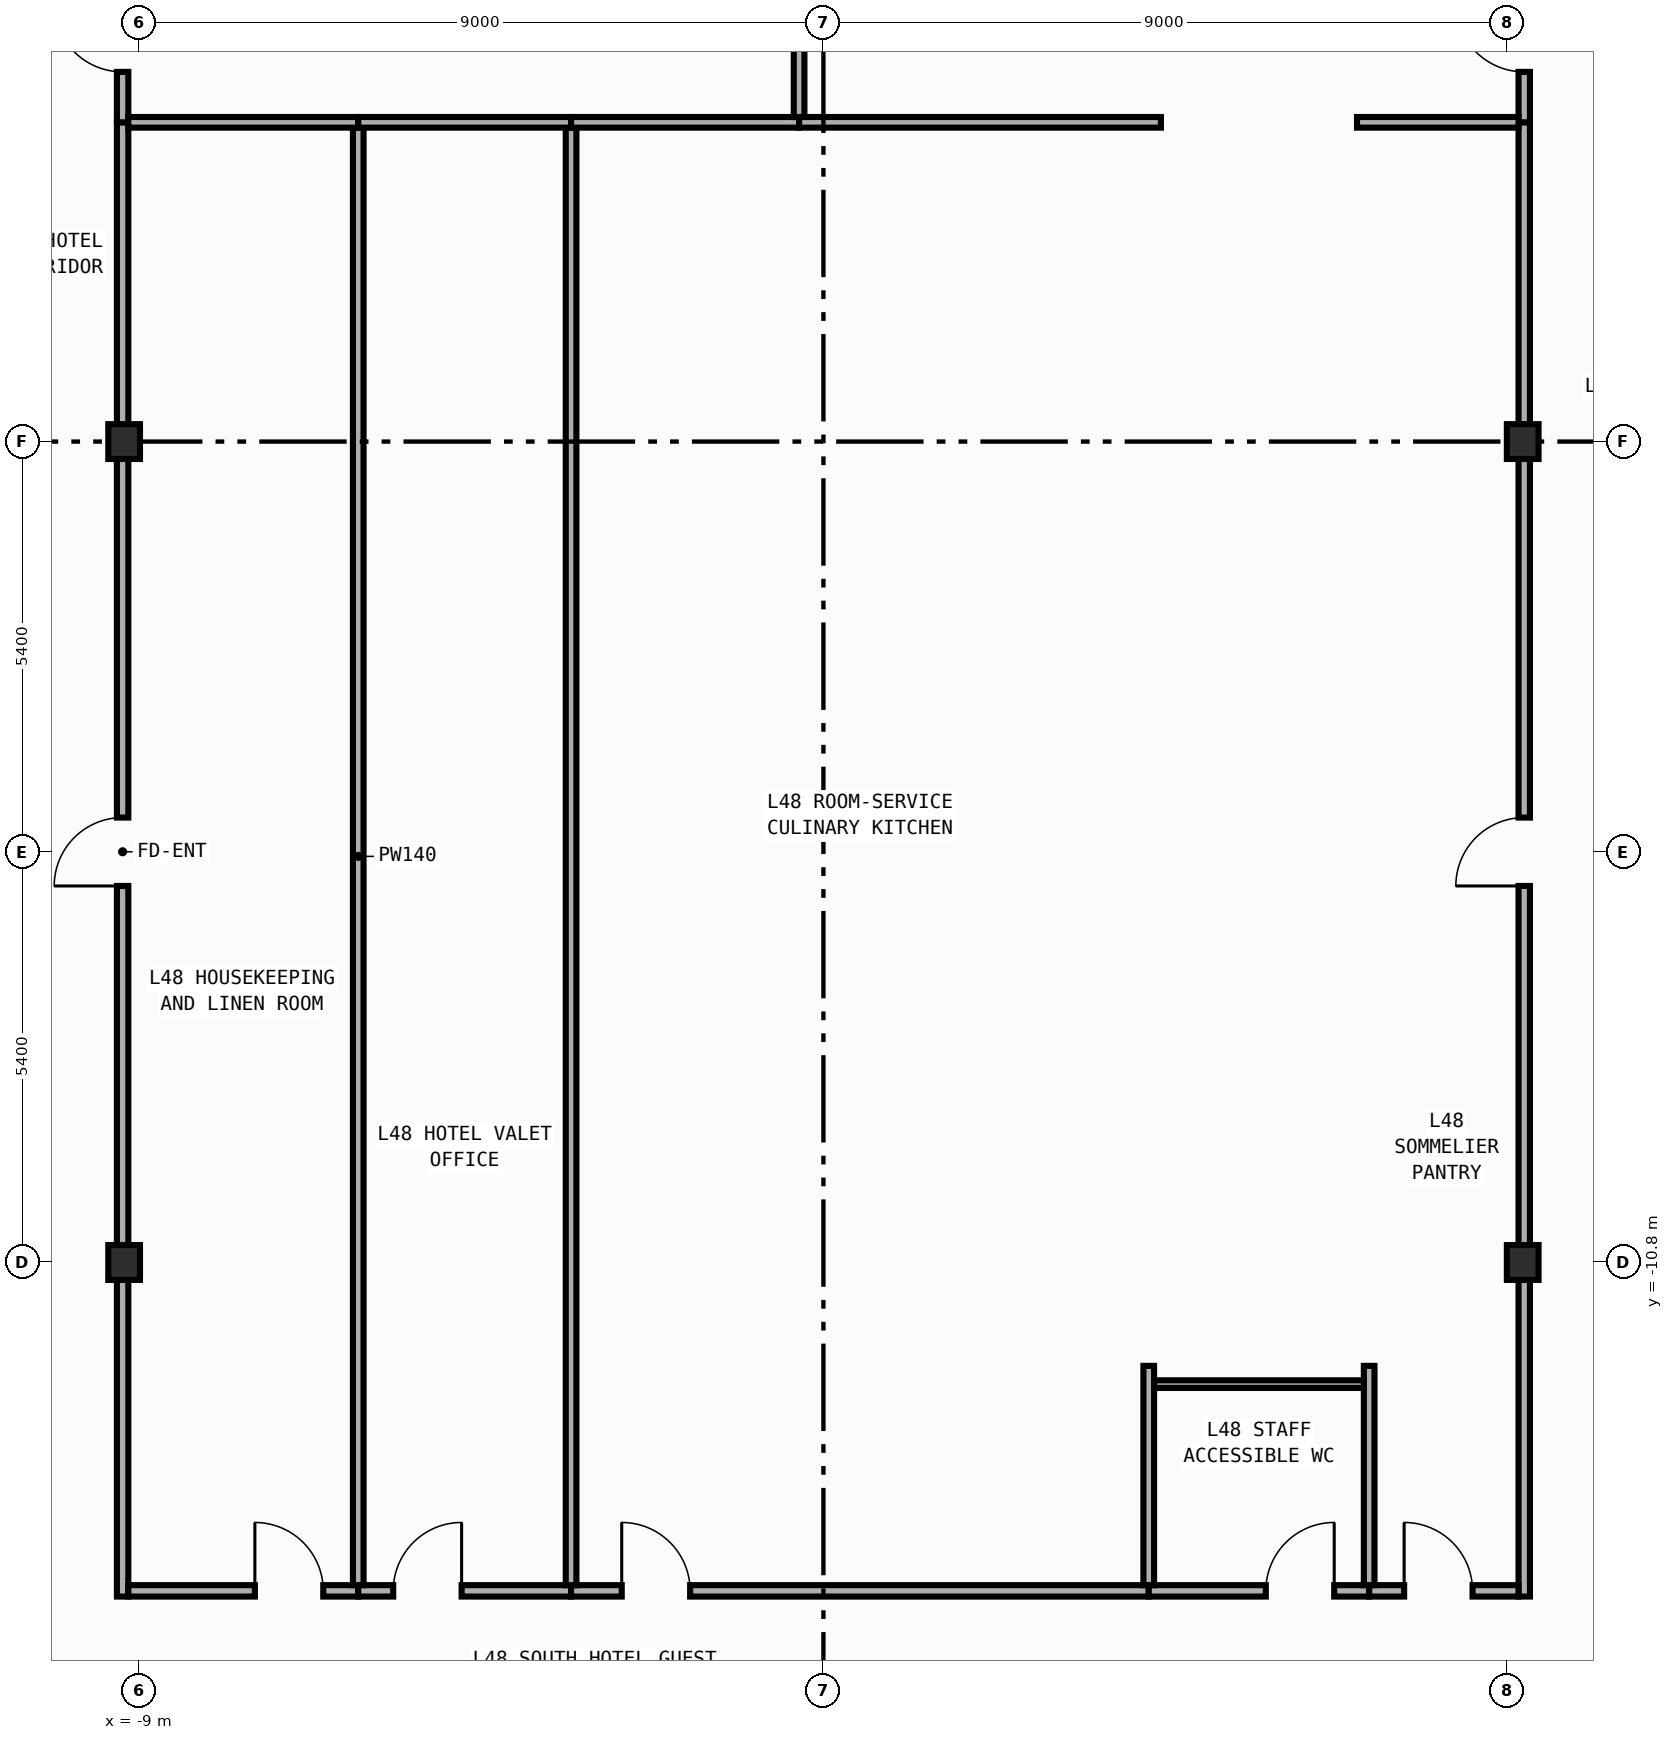
"""IFC4 building model, lengths in metres.
Left out: names, types, materials, properties, quantities, classifications, styles, units other than length and angle.
Written with IfcOpenShell. Run it as: python <this file> out.ifc"""

import sys

from ifc_helpers import new_model, si_unit, direction, frame, frame_2d, origin, origin_2d, place, context, subcontext, project, spatial, rectangle, i_section, extrude, element, fill, save


model = new_model("IFC4")
c1 = context("Model", 3, precision=1e-05, world=origin(), true_north=direction((0.0, 1.0)))
c2 = subcontext(c1, "Body", "Model", "MODEL_VIEW")
j1 = project(units=[si_unit("LENGTHUNIT", "METRE"), si_unit("PLANEANGLEUNIT", "RADIAN")], contexts=[c1])
p1 = place(None, origin())
s1 = spatial("IfcSite", under=j1, at=p1, CompositionType="ELEMENT")
p2 = place(p1, origin())
s2 = spatial("IfcBuilding", under=s1, at=p2, CompositionType="ELEMENT")
p3 = place(p2, frame((0.0, 0.0, 206.8)))
s3 = spatial("IfcBuildingStorey", under=s2, at=p3, CompositionType="ELEMENT", Elevation=206.8)
for number, where, z_axis, x_axis in (
    (1, (-9.2, -10.8, 0.0), (0.0, 0.0, 1.0), (1.0, 0.0, 0.0)),
    (2, (-9.2, 0.0, 0.0), (0.0, 0.0, 1.0), (1.0, 0.0, 0.0)),
    (3, (9.2, -10.8, 0.0), (0.0, 0.0, 1.0), (1.0, 0.0, 0.0)),
    (4, (9.2, 0.0, 0.0), (0.0, 0.0, 1.0), (1.0, 0.0, 0.0)),
):
    element("IfcColumn", number, at=place(p3, frame(where, z_axis=z_axis, x_axis=x_axis)), inside=s3, PredefinedType="COLUMN", context=c2, shape_type="SweptSolid", body=[
        extrude(i_section(OverallWidth=0.417, OverallDepth=0.458, WebThickness=0.03, FlangeThickness=0.05, FilletRadius=0.022, at=origin_2d()), origin(), (0.0, 0.0, 1.0), 3.8),
    ])
p4 = place(p3, frame((-9.22, -15.195, 0.0), z_axis=(0.0, 0.0, 1.0), x_axis=(0.0, 1.0, 0.0)))
e5 = element("IfcWall", 5, at=p4, inside=s3, PredefinedType="PARTITIONING", context=c2, shape_type="SweptSolid", body=[
    extrude(rectangle(XDim=19.395, YDim=0.15, at=frame_2d((9.698, 0.0))), origin(), (0.0, 0.0, 1.0), 2.952),
])
p5 = place(p4, frame((9.348, 0.0, 0.0)))
e6 = element("IfcOpeningElement", 6, at=p5, cuts=e5, PredefinedType="OPENING", context=c2, shape_type="SweptSolid", body=[
    extrude(rectangle(XDim=0.9, YDim=2.15, at=frame_2d((0.45, 1.075))), frame((0.0, 0.085, 0.0), z_axis=(0.0, -1.0, 0.0), x_axis=(1.0, 0.0, 0.0)), (0.0, 0.0, 1.0), 0.17),
])
p6 = place(p3, frame((-9.22, 4.2, 0.0), z_axis=(0.0, 0.0, 1.0), x_axis=(0.0, 1.0, 0.0)))
e7 = element("IfcWall", 7, at=p6, inside=s3, PredefinedType="PARTITIONING", context=c2, shape_type="SweptSolid", body=[
    extrude(rectangle(XDim=12.195, YDim=0.15, at=frame_2d((6.098, 0.0))), origin(), (0.0, 0.0, 1.0), 2.952),
])
p7 = place(p6, frame((0.663, 0.0, 0.0)))
e8 = element("IfcOpeningElement", 8, at=p7, cuts=e7, PredefinedType="OPENING", context=c2, shape_type="SweptSolid", body=[
    extrude(rectangle(XDim=0.9, YDim=2.15, at=frame_2d((0.45, 1.075))), frame((0.0, 0.085, 0.0), z_axis=(0.0, -1.0, 0.0), x_axis=(1.0, 0.0, 0.0)), (0.0, 0.0, 1.0), 0.17),
])
p8 = place(p3, frame((9.22, -15.195, 0.0), z_axis=(0.0, 0.0, 1.0), x_axis=(0.0, 1.0, 0.0)))
e9 = element("IfcWall", 9, at=p8, inside=s3, PredefinedType="PARTITIONING", context=c2, shape_type="SweptSolid", body=[
    extrude(rectangle(XDim=19.395, YDim=0.15, at=frame_2d((9.698, 0.0))), origin(), (0.0, 0.0, 1.0), 2.952),
])
p9 = place(p8, frame((9.348, 0.0, 0.0)))
e10 = element("IfcOpeningElement", 10, at=p9, cuts=e9, PredefinedType="OPENING", context=c2, shape_type="SweptSolid", body=[
    extrude(rectangle(XDim=0.9, YDim=2.15, at=frame_2d((0.45, 1.075))), frame((0.0, 0.085, 0.0), z_axis=(0.0, -1.0, 0.0), x_axis=(1.0, 0.0, 0.0)), (0.0, 0.0, 1.0), 0.17),
])
p10 = place(p3, frame((9.22, 4.2, 0.0), z_axis=(0.0, 0.0, 1.0), x_axis=(0.0, 1.0, 0.0)))
e11 = element("IfcWall", 11, at=p10, inside=s3, PredefinedType="PARTITIONING", context=c2, shape_type="SweptSolid", body=[
    extrude(rectangle(XDim=12.195, YDim=0.15, at=frame_2d((6.098, 0.0))), origin(), (0.0, 0.0, 1.0), 2.952),
])
p11 = place(p10, frame((0.663, 0.0, 0.0)))
e12 = element("IfcOpeningElement", 12, at=p11, cuts=e11, PredefinedType="OPENING", context=c2, shape_type="SweptSolid", body=[
    extrude(rectangle(XDim=0.9, YDim=2.15, at=frame_2d((0.45, 1.075))), frame((0.0, 0.085, 0.0), z_axis=(0.0, -1.0, 0.0), x_axis=(1.0, 0.0, 0.0)), (0.0, 0.0, 1.0), 0.17),
])
p12 = place(p3, frame((-9.145, -15.12, 0.0), z_axis=(0.0, 0.0, 1.0), x_axis=(1.0, 0.0, 0.0)))
e13 = element("IfcWall", 13, at=p12, inside=s3, PredefinedType="PARTITIONING", context=c2, shape_type="SweptSolid", body=[
    extrude(rectangle(XDim=3.025, YDim=0.15, at=frame_2d((1.512, 0.0))), origin(), (0.0, 0.0, 1.0), 3.54),
])
p13 = place(p12, frame((1.665, 0.0, 0.0)))
e14 = element("IfcOpeningElement", 14, at=p13, cuts=e13, PredefinedType="OPENING", context=c2, shape_type="SweptSolid", body=[
    extrude(rectangle(XDim=0.9, YDim=2.15, at=frame_2d((0.45, 1.075))), frame((0.0, 0.085, 0.0), z_axis=(0.0, -1.0, 0.0), x_axis=(1.0, 0.0, 0.0)), (0.0, 0.0, 1.0), 0.17),
])
p14 = place(p3, frame((-6.12, -15.12, 0.0), z_axis=(0.0, 0.0, 1.0), x_axis=(1.0, 0.0, 0.0)))
e15 = element("IfcWall", 15, at=p14, inside=s3, PredefinedType="PARTITIONING", context=c2, shape_type="SweptSolid", body=[
    extrude(rectangle(XDim=2.8, YDim=0.15, at=frame_2d((1.4, 0.0))), origin(), (0.0, 0.0, 1.0), 3.54),
])
p15 = place(p14, frame((0.46, 0.0, 0.0)))
e16 = element("IfcOpeningElement", 16, at=p15, cuts=e15, PredefinedType="OPENING", context=c2, shape_type="SweptSolid", body=[
    extrude(rectangle(XDim=0.9, YDim=2.15, at=frame_2d((0.45, 1.075))), frame((0.0, 0.085, 0.0), z_axis=(0.0, -1.0, 0.0), x_axis=(1.0, 0.0, 0.0)), (0.0, 0.0, 1.0), 0.17),
])
p16 = place(p3, frame((-3.32, -15.12, 0.0), z_axis=(0.0, 0.0, 1.0), x_axis=(1.0, 0.0, 0.0)))
e17 = element("IfcWall", 17, at=p16, inside=s3, PredefinedType="PARTITIONING", context=c2, shape_type="SweptSolid", body=[
    extrude(rectangle(XDim=7.6, YDim=0.15, at=frame_2d((3.8, 0.0))), origin(), (0.0, 0.0, 1.0), 3.54),
])
p17 = place(p16, frame((0.667, 0.0, 0.0)))
e18 = element("IfcOpeningElement", 18, at=p17, cuts=e17, PredefinedType="OPENING", context=c2, shape_type="SweptSolid", body=[
    extrude(rectangle(XDim=0.9, YDim=2.15, at=frame_2d((0.45, 1.075))), frame((0.0, 0.085, 0.0), z_axis=(0.0, -1.0, 0.0), x_axis=(1.0, 0.0, 0.0)), (0.0, 0.0, 1.0), 0.17),
])
p18 = place(p3, frame((4.28, -15.12, 0.0), z_axis=(0.0, 0.0, 1.0), x_axis=(1.0, 0.0, 0.0)))
e19 = element("IfcWall", 19, at=p18, inside=s3, PredefinedType="PARTITIONING", context=c2, shape_type="SweptSolid", body=[
    extrude(rectangle(XDim=2.9, YDim=0.15, at=frame_2d((1.45, 0.0))), origin(), (0.0, 0.0, 1.0), 3.54),
])
p19 = place(p18, frame((1.54, 0.0, 0.0)))
e20 = element("IfcOpeningElement", 20, at=p19, cuts=e19, PredefinedType="OPENING", context=c2, shape_type="SweptSolid", body=[
    extrude(rectangle(XDim=0.9, YDim=2.15, at=frame_2d((0.45, 1.075))), frame((0.0, 0.085, 0.0), z_axis=(0.0, -1.0, 0.0), x_axis=(1.0, 0.0, 0.0)), (0.0, 0.0, 1.0), 0.17),
])
p20 = place(p3, frame((7.18, -15.12, 0.0), z_axis=(0.0, 0.0, 1.0), x_axis=(1.0, 0.0, 0.0)))
e21 = element("IfcWall", 21, at=p20, inside=s3, PredefinedType="PARTITIONING", context=c2, shape_type="SweptSolid", body=[
    extrude(rectangle(XDim=1.965, YDim=0.15, at=frame_2d((0.982, 0.0))), origin(), (0.0, 0.0, 1.0), 3.54),
])
p21 = place(p20, frame((0.46, 0.0, 0.0)))
e22 = element("IfcOpeningElement", 22, at=p21, cuts=e21, PredefinedType="OPENING", context=c2, shape_type="SweptSolid", body=[
    extrude(rectangle(XDim=0.9, YDim=2.15, at=frame_2d((0.45, 1.075))), frame((0.0, 0.085, 0.0), z_axis=(0.0, -1.0, 0.0), x_axis=(1.0, 0.0, 0.0)), (0.0, 0.0, 1.0), 0.17),
])
p22 = place(p3, frame((-6.12, -15.045, 0.0), z_axis=(0.0, 0.0, 1.0), x_axis=(0.0, 1.0, 0.0)))
e23 = element("IfcWall", 23, at=p22, inside=s3, PredefinedType="PARTITIONING", context=c2, shape_type="SweptSolid", body=[
    extrude(rectangle(XDim=19.175, YDim=0.14, at=frame_2d((9.587, 0.0))), origin(), (0.0, 0.0, 1.0), 3.54),
])
p23 = place(p3, frame((-9.145, 4.2, 0.0), z_axis=(0.0, 0.0, 1.0), x_axis=(1.0, 0.0, 0.0)))
e24 = element("IfcWall", 24, at=p23, inside=s3, PredefinedType="PARTITIONING", context=c2, shape_type="SweptSolid", body=[
    extrude(rectangle(XDim=3.025, YDim=0.14, at=frame_2d((1.512, 0.0))), origin(), (0.0, 0.0, 1.0), 3.54),
])
p24 = place(p3, frame((-3.32, -15.045, 0.0), z_axis=(0.0, 0.0, 1.0), x_axis=(0.0, 1.0, 0.0)))
e25 = element("IfcWall", 25, at=p24, inside=s3, PredefinedType="PARTITIONING", context=c2, shape_type="SweptSolid", body=[
    extrude(rectangle(XDim=19.175, YDim=0.14, at=frame_2d((9.587, 0.0))), origin(), (0.0, 0.0, 1.0), 3.54),
])
p25 = place(p3, frame((-6.12, 4.2, 0.0), z_axis=(0.0, 0.0, 1.0), x_axis=(1.0, 0.0, 0.0)))
e26 = element("IfcWall", 26, at=p25, inside=s3, PredefinedType="PARTITIONING", context=c2, shape_type="SweptSolid", body=[
    extrude(rectangle(XDim=2.8, YDim=0.14, at=frame_2d((1.4, 0.0))), origin(), (0.0, 0.0, 1.0), 3.54),
])
p26 = place(p3, frame((4.28, -15.045, 0.0), z_axis=(0.0, 0.0, 1.0), x_axis=(0.0, 1.0, 0.0)))
e27 = element("IfcWall", 27, at=p26, inside=s3, PredefinedType="PARTITIONING", context=c2, shape_type="SweptSolid", body=[
    extrude(rectangle(XDim=2.885, YDim=0.14, at=frame_2d((1.442, 0.0))), origin(), (0.0, 0.0, 1.0), 3.54),
])
p27 = place(p3, frame((-3.32, 4.2, 0.0), z_axis=(0.0, 0.0, 1.0), x_axis=(1.0, 0.0, 0.0)))
e28 = element("IfcWall", 28, at=p27, inside=s3, PredefinedType="PARTITIONING", context=c2, shape_type="SweptSolid", body=[
    extrude(rectangle(XDim=3.0, YDim=0.14, at=frame_2d((1.5, 0.0))), origin(), (0.0, 0.0, 1.0), 3.54),
])
p28 = place(p3, frame((-0.32, 4.2, 0.0), z_axis=(0.0, 0.0, 1.0), x_axis=(1.0, 0.0, 0.0)))
e29 = element("IfcWall", 29, at=p28, inside=s3, PredefinedType="PARTITIONING", context=c2, shape_type="SweptSolid", body=[
    extrude(rectangle(XDim=4.76, YDim=0.14, at=frame_2d((2.38, 0.0))), origin(), (0.0, 0.0, 1.0), 3.54),
])
p29 = place(p3, frame((7.18, -15.045, 0.0), z_axis=(0.0, 0.0, 1.0), x_axis=(0.0, 1.0, 0.0)))
e30 = element("IfcWall", 30, at=p29, inside=s3, PredefinedType="PARTITIONING", context=c2, shape_type="SweptSolid", body=[
    extrude(rectangle(XDim=2.885, YDim=0.14, at=frame_2d((1.442, 0.0))), origin(), (0.0, 0.0, 1.0), 3.54),
])
p30 = place(p3, frame((7.02, 4.2, 0.0), z_axis=(0.0, 0.0, 1.0), x_axis=(1.0, 0.0, 0.0)))
e31 = element("IfcWall", 31, at=p30, inside=s3, PredefinedType="PARTITIONING", context=c2, shape_type="SweptSolid", body=[
    extrude(rectangle(XDim=2.125, YDim=0.14, at=frame_2d((1.062, 0.0))), origin(), (0.0, 0.0, 1.0), 3.54),
])
p31 = place(p3, frame((-0.32, 4.27, 0.0), z_axis=(0.0, 0.0, 1.0), x_axis=(0.0, 1.0, 0.0)))
e32 = element("IfcWall", 32, at=p31, inside=s3, PredefinedType="PARTITIONING", context=c2, shape_type="SweptSolid", body=[
    extrude(rectangle(XDim=11.975, YDim=0.14, at=frame_2d((5.988, 0.0))), origin(), (0.0, 0.0, 1.0), 3.54),
])
p32 = place(p3, frame((4.35, -12.4, 0.0), z_axis=(0.0, 0.0, 1.0), x_axis=(1.0, 0.0, 0.0)))
e33 = element("IfcWall", 33, at=p32, inside=s3, PredefinedType="PARTITIONING", context=c2, shape_type="SweptSolid", body=[
    extrude(rectangle(XDim=2.76, YDim=0.1, at=frame_2d((1.38, 0.0))), origin(), (0.0, 0.0, 1.0), 3.54),
])
p33 = place(p5, origin())
e34 = element("IfcDoor", 34, at=p33, inside=s3, OperationType="SINGLE_SWING_LEFT", PredefinedType="DOOR", context=c2, shape_type="SweptSolid", body=[
    extrude(rectangle(XDim=0.9, YDim=2.15, at=frame_2d((0.45, 1.075))), frame((0.0, 0.025, 0.0), z_axis=(0.0, -1.0, 0.0), x_axis=(1.0, 0.0, 0.0)), (0.0, 0.0, 1.0), 0.05),
])
fill(e6, e34)
p34 = place(p7, origin())
e35 = element("IfcDoor", 35, at=p34, inside=s3, OperationType="SINGLE_SWING_RIGHT", PredefinedType="DOOR", context=c2, shape_type="SweptSolid", body=[
    extrude(rectangle(XDim=0.9, YDim=2.15, at=frame_2d((0.45, 1.075))), frame((0.0, 0.025, 0.0), z_axis=(0.0, -1.0, 0.0), x_axis=(1.0, 0.0, 0.0)), (0.0, 0.0, 1.0), 0.05),
])
fill(e8, e35)
p35 = place(p9, origin())
e36 = element("IfcDoor", 36, at=p35, inside=s3, OperationType="SINGLE_SWING_LEFT", PredefinedType="DOOR", context=c2, shape_type="SweptSolid", body=[
    extrude(rectangle(XDim=0.9, YDim=2.15, at=frame_2d((0.45, 1.075))), frame((0.0, 0.025, 0.0), z_axis=(0.0, -1.0, 0.0), x_axis=(1.0, 0.0, 0.0)), (0.0, 0.0, 1.0), 0.05),
])
fill(e10, e36)
p36 = place(p11, origin())
e37 = element("IfcDoor", 37, at=p36, inside=s3, OperationType="SINGLE_SWING_RIGHT", PredefinedType="DOOR", context=c2, shape_type="SweptSolid", body=[
    extrude(rectangle(XDim=0.9, YDim=2.15, at=frame_2d((0.45, 1.075))), frame((0.0, 0.025, 0.0), z_axis=(0.0, -1.0, 0.0), x_axis=(1.0, 0.0, 0.0)), (0.0, 0.0, 1.0), 0.05),
])
fill(e12, e37)
p37 = place(p13, origin())
e38 = element("IfcDoor", 38, at=p37, inside=s3, OperationType="SINGLE_SWING_LEFT", PredefinedType="DOOR", context=c2, shape_type="SweptSolid", body=[
    extrude(rectangle(XDim=0.9, YDim=2.15, at=frame_2d((0.45, 1.075))), frame((0.0, 0.025, 0.0), z_axis=(0.0, -1.0, 0.0), x_axis=(1.0, 0.0, 0.0)), (0.0, 0.0, 1.0), 0.05),
])
fill(e14, e38)
p38 = place(p15, origin())
e39 = element("IfcDoor", 39, at=p38, inside=s3, OperationType="SINGLE_SWING_RIGHT", PredefinedType="DOOR", context=c2, shape_type="SweptSolid", body=[
    extrude(rectangle(XDim=0.9, YDim=2.15, at=frame_2d((0.45, 1.075))), frame((0.0, 0.025, 0.0), z_axis=(0.0, -1.0, 0.0), x_axis=(1.0, 0.0, 0.0)), (0.0, 0.0, 1.0), 0.05),
])
fill(e16, e39)
p39 = place(p17, origin())
e40 = element("IfcDoor", 40, at=p39, inside=s3, OperationType="SINGLE_SWING_LEFT", PredefinedType="DOOR", context=c2, shape_type="SweptSolid", body=[
    extrude(rectangle(XDim=0.9, YDim=2.15, at=frame_2d((0.45, 1.075))), frame((0.0, 0.025, 0.0), z_axis=(0.0, -1.0, 0.0), x_axis=(1.0, 0.0, 0.0)), (0.0, 0.0, 1.0), 0.05),
])
fill(e18, e40)
p40 = place(p19, origin())
e41 = element("IfcDoor", 41, at=p40, inside=s3, OperationType="SINGLE_SWING_RIGHT", PredefinedType="DOOR", context=c2, shape_type="SweptSolid", body=[
    extrude(rectangle(XDim=0.9, YDim=2.15, at=frame_2d((0.45, 1.075))), frame((0.0, 0.025, 0.0), z_axis=(0.0, -1.0, 0.0), x_axis=(1.0, 0.0, 0.0)), (0.0, 0.0, 1.0), 0.05),
])
fill(e20, e41)
p41 = place(p21, origin())
e42 = element("IfcDoor", 42, at=p41, inside=s3, OperationType="SINGLE_SWING_LEFT", PredefinedType="DOOR", context=c2, shape_type="SweptSolid", body=[
    extrude(rectangle(XDim=0.9, YDim=2.15, at=frame_2d((0.45, 1.075))), frame((0.0, 0.025, 0.0), z_axis=(0.0, -1.0, 0.0), x_axis=(1.0, 0.0, 0.0)), (0.0, 0.0, 1.0), 0.05),
])
fill(e22, e42)
save(model, sys.argv[1])
